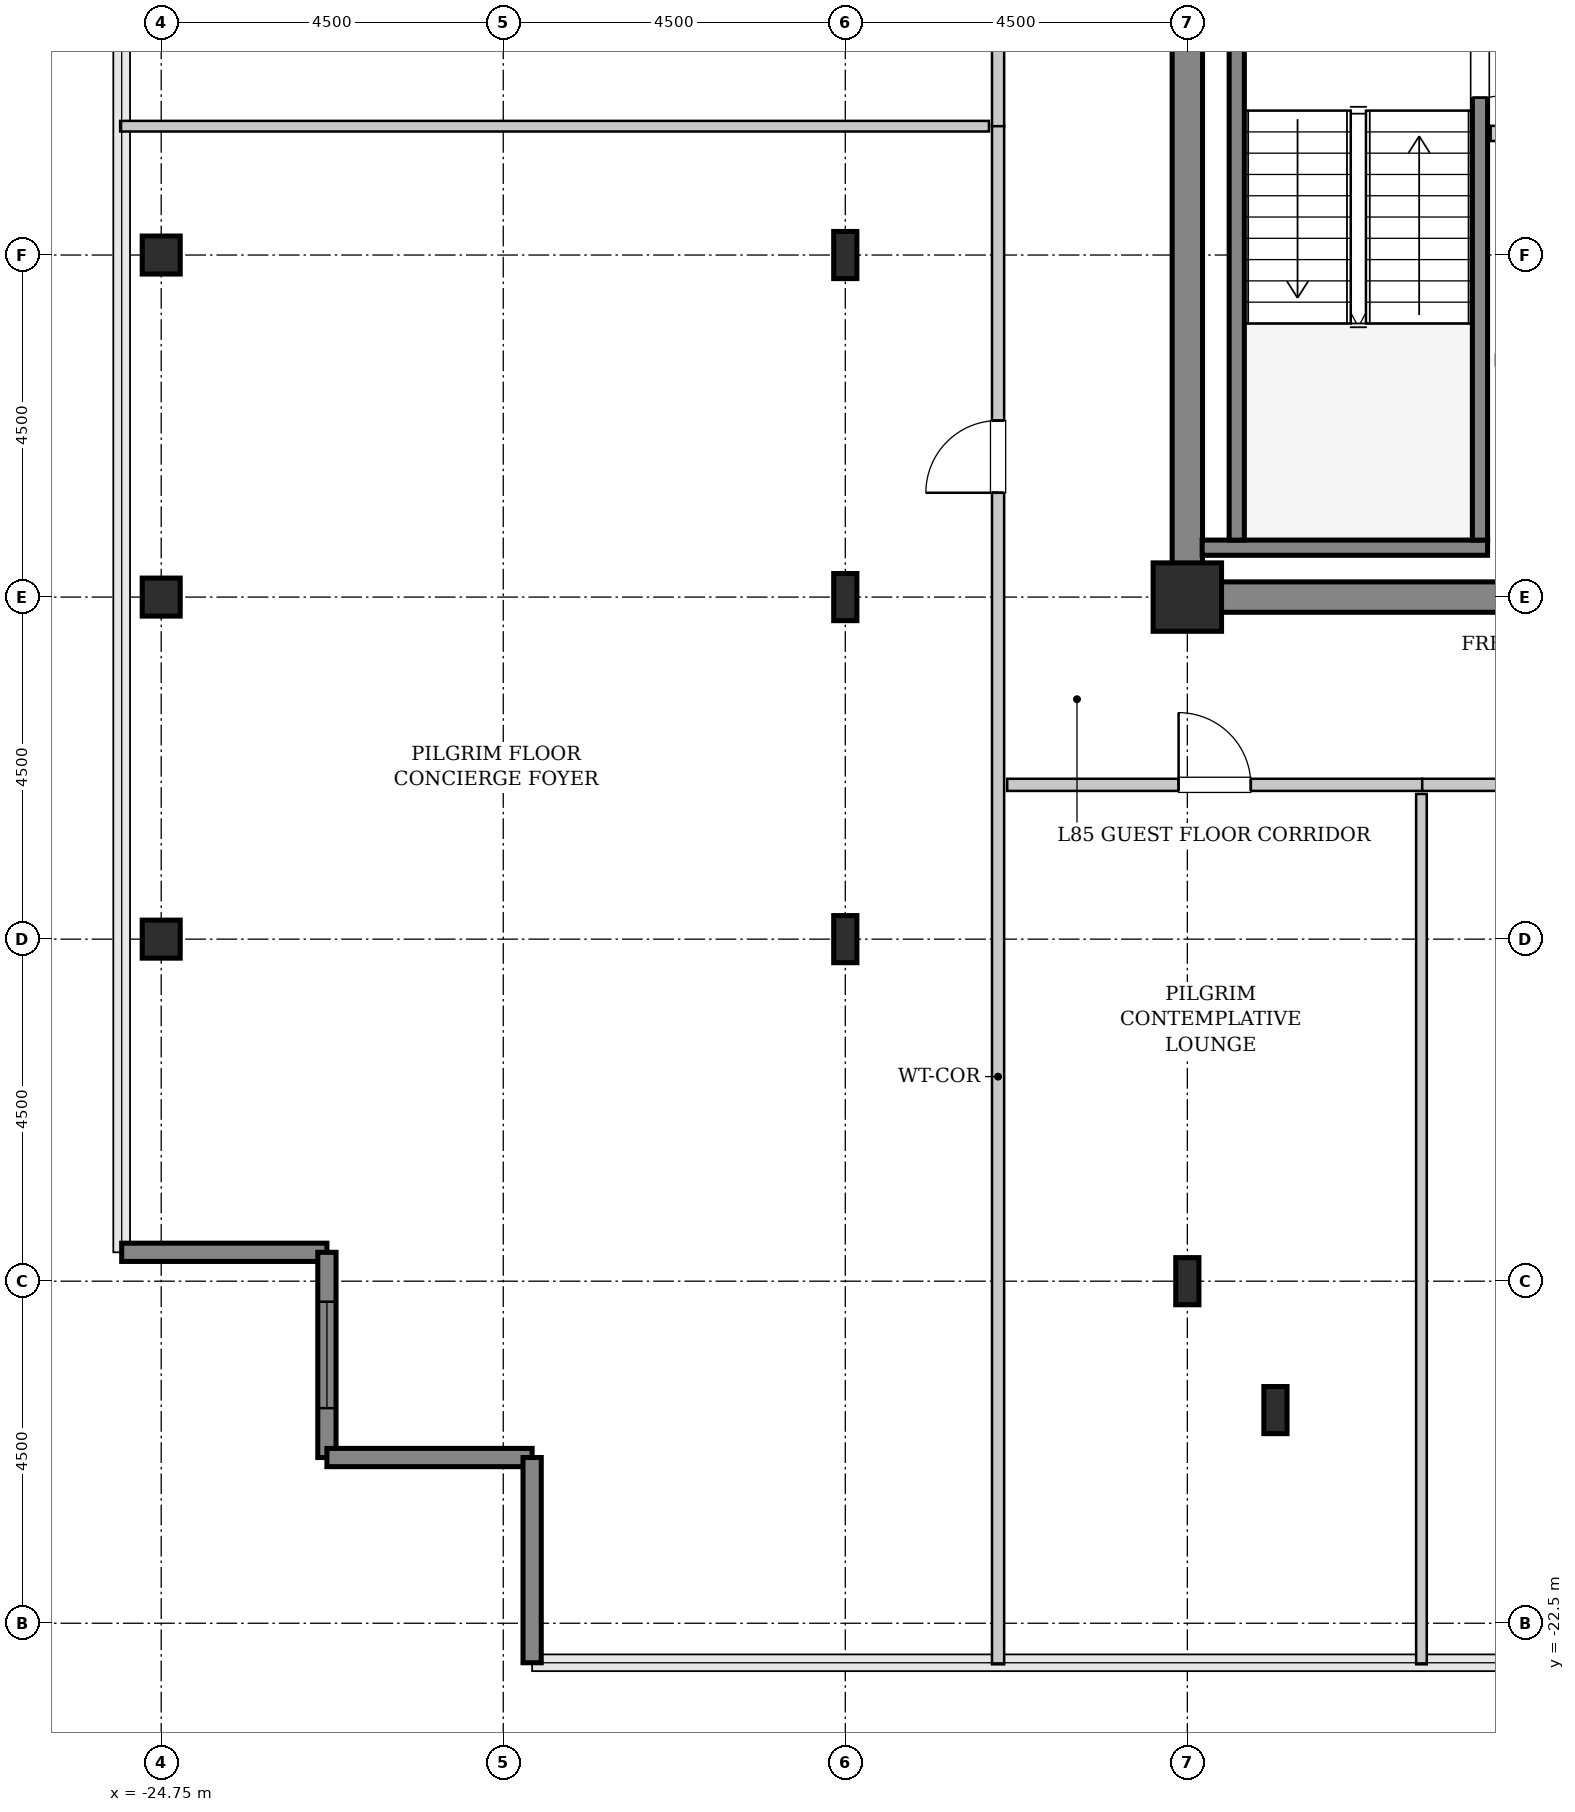
"""IFC4 building model, lengths in metres.
Left out: names, types, materials, properties, quantities, classifications, styles, units other than length and angle.
Written with IfcOpenShell. Run it as: python <this file> out.ifc"""

import sys

from ifc_helpers import new_model, si_unit, direction, frame, frame_2d, origin, origin_2d, place, context, subcontext, project, spatial, rectangle, hollow_rectangle, i_section, extrude, source, transform, mapped, element, fill, save


model = new_model("IFC4")
c1 = context("Model", 3, precision=1e-05, world=origin(), true_north=direction((0.0, 1.0)))
c2 = subcontext(c1, "Body", "Model", "MODEL_VIEW")
j1 = project(units=[si_unit("LENGTHUNIT", "METRE"), si_unit("PLANEANGLEUNIT", "RADIAN")], contexts=[c1])
p1 = place(None, origin())
s1 = spatial("IfcSite", under=j1, at=p1, CompositionType="ELEMENT")
p2 = place(p1, origin())
s2 = spatial("IfcBuilding", under=s1, at=p2, CompositionType="ELEMENT")
p3 = place(p2, frame((0.0, 0.0, 337.6)))
s3 = spatial("IfcBuildingStorey", under=s2, at=p3, CompositionType="ELEMENT", Elevation=337.6)
m1 = source(origin(), c2, "Body", "SweptSolid", [
    extrude(rectangle(XDim=9.9, YDim=0.4, at=frame_2d((4.95, 0.0))), origin(), (0.0, 0.0, 1.0), 3.8),
])
p4 = place(p3, frame((-11.45, -9.0, 0.0), z_axis=(0.0, 0.0, 1.0), x_axis=(1.0, 0.0, 0.0)))
e1 = element("IfcWall", 1, at=p4, inside=s3, PredefinedType="SHEAR", context=c2, shape_type="MappedRepresentation", body=[
    mapped(m1, transform((0.0, 0.0, 0.0), x_axis=(1.0, 0.0, 0.0), y_axis=(0.0, 1.0, 0.0), z_axis=(0.0, 0.0, 1.0), scale=1.0)),
])
m2 = source(origin(), c2, "Body", "SweptSolid", [
    extrude(rectangle(XDim=7.45, YDim=0.4, at=frame_2d((3.725, 0.0))), origin(), (0.0, 0.0, 1.0), 3.8),
])
p5 = place(p3, frame((-11.25, -8.8, 0.0), z_axis=(0.0, 0.0, 1.0), x_axis=(0.0, 1.0, 0.0)))
e2 = element("IfcWall", 2, at=p5, inside=s3, PredefinedType="SHEAR", context=c2, shape_type="MappedRepresentation", body=[
    mapped(m2, transform((0.0, 0.0, 0.0), x_axis=(1.0, 0.0, 0.0), y_axis=(0.0, 1.0, 0.0), z_axis=(0.0, 0.0, 1.0), scale=1.0)),
])
m3 = source(origin(), c2, "Body", "SweptSolid", [
    extrude(hollow_rectangle(XDim=0.5, YDim=0.5, WallThickness=0.025, InnerFilletRadius=0.025, OuterFilletRadius=0.05, at=origin_2d()), origin(), (0.0, 0.0, 1.0), 3.8),
])
for number, where, z_axis, x_axis in (
    (3, (-24.75, -13.5, 0.0), (0.0, 0.0, 1.0), (1.0, 0.0, 0.0)),
    (4, (-24.75, -9.0, 0.0), (0.0, 0.0, 1.0), (1.0, 0.0, 0.0)),
    (5, (-24.75, -4.5, 0.0), (0.0, 0.0, 1.0), (1.0, 0.0, 0.0)),
):
    element("IfcColumn", number, at=place(p3, frame(where, z_axis=z_axis, x_axis=x_axis)), inside=s3, PredefinedType="COLUMN", context=c2, shape_type="MappedRepresentation", body=[
        mapped(m3, transform((0.0, 0.0, 0.0), x_axis=(1.0, 0.0, 0.0), y_axis=(0.0, 1.0, 0.0), z_axis=(0.0, 0.0, 1.0), scale=1.0)),
    ])
m4 = source(origin(), c2, "Body", "SweptSolid", [
    extrude(i_section(OverallWidth=0.305, OverallDepth=0.62, WebThickness=0.021, FlangeThickness=0.04, FilletRadius=0.027, at=origin_2d()), origin(), (0.0, 0.0, 1.0), 3.8),
])
for number, where, z_axis, x_axis in (
    (6, (-15.75, -13.5, 0.0), (0.0, 0.0, 1.0), (1.0, 0.0, 0.0)),
    (7, (-15.75, -9.0, 0.0), (0.0, 0.0, 1.0), (1.0, 0.0, 0.0)),
    (8, (-15.75, -4.5, 0.0), (0.0, 0.0, 1.0), (1.0, 0.0, 0.0)),
    (9, (-11.25, -18.0, 0.0), (0.0, 0.0, 1.0), (1.0, 0.0, 0.0)),
):
    element("IfcColumn", number, at=place(p3, frame(where, z_axis=z_axis, x_axis=x_axis)), inside=s3, PredefinedType="COLUMN", context=c2, shape_type="MappedRepresentation", body=[
        mapped(m4, transform((0.0, 0.0, 0.0), x_axis=(1.0, 0.0, 0.0), y_axis=(0.0, 1.0, 0.0), z_axis=(0.0, 0.0, 1.0), scale=1.0)),
    ])
m5 = source(origin(), c2, "Body", "SweptSolid", [
    extrude(rectangle(XDim=0.9, YDim=0.9, at=origin_2d()), origin(), (0.0, 0.0, 1.0), 3.8),
])
p6 = place(p3, frame((-11.25, -9.0, 0.0), z_axis=(0.0, 0.0, 1.0), x_axis=(1.0, 0.0, 0.0)))
e10 = element("IfcColumn", 10, at=p6, inside=s3, PredefinedType="COLUMN", context=c2, shape_type="MappedRepresentation", body=[
    mapped(m5, transform((0.0, 0.0, 0.0), x_axis=(1.0, 0.0, 0.0), y_axis=(0.0, 1.0, 0.0), z_axis=(0.0, 0.0, 1.0), scale=1.0)),
])
p7 = place(p3, frame((-10.091, -19.696, 0.0), z_axis=(0.0, 0.0, 1.0), x_axis=(1.0, 0.0, 0.0)))
e11 = element("IfcColumn", 11, at=p7, inside=s3, PredefinedType="COLUMN", context=c2, shape_type="MappedRepresentation", body=[
    mapped(m4, transform((0.0, 0.0, 0.0), x_axis=(1.0, 0.0, 0.0), y_axis=(0.0, 1.0, 0.0), z_axis=(0.0, 0.0, 1.0), scale=1.0)),
])
m6 = source(origin(), c2, "Body", "SweptSolid", [
    extrude(rectangle(XDim=2.7, YDim=0.24, at=frame_2d((1.35, 0.0))), origin(), (0.0, 0.0, 1.0), 3.55),
])
p8 = place(p3, frame((-25.27, -17.62, 0.0), z_axis=(0.0, 0.0, 1.0), x_axis=(1.0, 0.0, 0.0)))
e12 = element("IfcWall", 12, at=p8, inside=s3, PredefinedType="SHEAR", context=c2, shape_type="MappedRepresentation", body=[
    mapped(m6, transform((0.0, 0.0, 0.0), x_axis=(1.0, 0.0, 0.0), y_axis=(0.0, 1.0, 0.0), z_axis=(0.0, 0.0, 1.0), scale=1.0)),
])
p9 = place(p3, frame((-22.57, -17.62, 0.0), z_axis=(0.0, 0.0, 1.0), x_axis=(0.0, -1.0, 0.0)))
e13 = element("IfcWall", 13, at=p9, inside=s3, PredefinedType="SHEAR", context=c2, shape_type="MappedRepresentation", body=[
    mapped(m6, transform((0.0, 0.0, 0.0), x_axis=(1.0, 0.0, 0.0), y_axis=(0.0, 1.0, 0.0), z_axis=(0.0, 0.0, 1.0), scale=1.0)),
])
p10 = place(p9, frame((0.65, 0.0, 0.85)))
e14 = element("IfcOpeningElement", 14, at=p10, cuts=e13, PredefinedType="OPENING", context=c2, shape_type="SweptSolid", body=[
    extrude(rectangle(XDim=1.4, YDim=1.8, at=frame_2d((0.7, 0.9))), frame((0.0, 0.13, 0.0), z_axis=(0.0, -1.0, 0.0), x_axis=(1.0, 0.0, 0.0)), (0.0, 0.0, 1.0), 0.26),
])
for number, where, z_axis, x_axis in (
    (15, (-22.57, -20.32, 0.0), (0.0, 0.0, 1.0), (1.0, 0.0, 0.0)),
    (16, (-19.87, -20.32, 0.0), (0.0, 0.0, 1.0), (0.0, -1.0, 0.0)),
):
    element("IfcWall", number, at=place(p3, frame(where, z_axis=z_axis, x_axis=x_axis)), inside=s3, PredefinedType="SHEAR", context=c2, shape_type="MappedRepresentation", body=[
        mapped(m6, transform((0.0, 0.0, 0.0), x_axis=(1.0, 0.0, 0.0), y_axis=(0.0, 1.0, 0.0), z_axis=(0.0, 0.0, 1.0), scale=1.0)),
    ])
m7 = source(origin(), c2, "Body", "SweptSolid", [
    extrude(rectangle(XDim=3.755, YDim=0.2, at=frame_2d((1.877, 0.0))), origin(), (0.0, 0.0, 1.0), 3.8),
])
p11 = place(p3, frame((-11.055, -8.35, 0.0), z_axis=(0.0, 0.0, 1.0), x_axis=(1.0, 0.0, 0.0)))
e17 = element("IfcWall", 17, at=p11, inside=s3, PredefinedType="SOLIDWALL", context=c2, shape_type="MappedRepresentation", body=[
    mapped(m7, transform((0.0, 0.0, 0.0), x_axis=(1.0, 0.0, 0.0), y_axis=(0.0, 1.0, 0.0), z_axis=(0.0, 0.0, 1.0), scale=1.0)),
])
m8 = source(origin(), c2, "Body", "SweptSolid", [
    extrude(rectangle(XDim=7.1, YDim=0.2, at=frame_2d((3.55, 0.0))), origin(), (0.0, 0.0, 1.0), 3.8),
])
p12 = place(p3, frame((-10.6, -1.15, 0.0), z_axis=(0.0, 0.0, 1.0), x_axis=(0.0, -1.0, 0.0)))
e18 = element("IfcWall", 18, at=p12, inside=s3, PredefinedType="SOLIDWALL", context=c2, shape_type="MappedRepresentation", body=[
    mapped(m8, transform((0.0, 0.0, 0.0), x_axis=(1.0, 0.0, 0.0), y_axis=(0.0, 1.0, 0.0), z_axis=(0.0, 0.0, 1.0), scale=1.0)),
])
p13 = place(p3, frame((-7.4, -1.15, 0.0), z_axis=(0.0, 0.0, 1.0), x_axis=(0.0, -1.0, 0.0)))
e19 = element("IfcWall", 19, at=p13, inside=s3, PredefinedType="SOLIDWALL", context=c2, shape_type="MappedRepresentation", body=[
    mapped(m8, transform((0.0, 0.0, 0.0), x_axis=(1.0, 0.0, 0.0), y_axis=(0.0, 1.0, 0.0), z_axis=(0.0, 0.0, 1.0), scale=1.0)),
])
p14 = place(p13, frame((0.18, 0.0, 0.0)))
e20 = element("IfcOpeningElement", 20, at=p14, cuts=e19, PredefinedType="OPENING", context=c2, shape_type="SweptSolid", body=[
    extrude(rectangle(XDim=1.1, YDim=2.15, at=frame_2d((0.55, 1.075))), frame((0.0, 0.11, 0.0), z_axis=(0.0, -1.0, 0.0), x_axis=(1.0, 0.0, 0.0)), (0.0, 0.0, 1.0), 0.22),
])
m9 = source(origin(), c2, "Body", "SweptSolid", [
    extrude(rectangle(XDim=2.9, YDim=0.2, at=frame_2d((1.45, 0.0))), origin(), (0.0, 0.0, 1.0), 3.535),
])
p15 = place(p3, frame((-7.26, -2.9, 0.0), z_axis=(0.0, 0.0, 1.0), x_axis=(1.0, 0.0, 0.0)))
e21 = element("IfcWall", 21, at=p15, inside=s3, PredefinedType="PARTITIONING", context=c2, shape_type="MappedRepresentation", body=[
    mapped(m9, transform((0.0, 0.0, 0.0), x_axis=(1.0, 0.0, 0.0), y_axis=(0.0, 1.0, 0.0), z_axis=(0.0, 0.0, 1.0), scale=1.0)),
])
m10 = source(origin(), c2, "Body", "SweptSolid", [
    extrude(rectangle(XDim=20.245, YDim=0.16, at=frame_2d((10.123, 0.0))), origin(), (0.0, 0.0, 1.0), 3.535),
])
p16 = place(p3, frame((-13.74, -23.04, 0.0), z_axis=(0.0, 0.0, 1.0), x_axis=(0.0, 1.0, 0.0)))
e22 = element("IfcWall", 22, at=p16, inside=s3, PredefinedType="PARTITIONING", context=c2, shape_type="MappedRepresentation", body=[
    mapped(m10, transform((0.0, 0.0, 0.0), x_axis=(1.0, 0.0, 0.0), y_axis=(0.0, 1.0, 0.0), z_axis=(0.0, 0.0, 1.0), scale=1.0)),
])
p17 = place(p16, frame((15.413, 0.0, 0.0)))
e23 = element("IfcOpeningElement", 23, at=p17, cuts=e22, PredefinedType="OPENING", context=c2, shape_type="SweptSolid", body=[
    extrude(rectangle(XDim=0.95, YDim=2.1, at=frame_2d((0.475, 1.05))), frame((0.0, 0.09, 0.0), z_axis=(0.0, -1.0, 0.0), x_axis=(1.0, 0.0, 0.0)), (0.0, 0.0, 1.0), 0.18),
])
m11 = source(origin(), c2, "Body", "SweptSolid", [
    extrude(rectangle(XDim=11.43, YDim=0.14, at=frame_2d((5.715, 0.0))), origin(), (0.0, 0.0, 1.0), 3.535),
])
p18 = place(p3, frame((-25.29, -2.805, 0.0), z_axis=(0.0, 0.0, 1.0), x_axis=(1.0, 0.0, 0.0)))
e24 = element("IfcWall", 24, at=p18, inside=s3, PredefinedType="PARTITIONING", context=c2, shape_type="MappedRepresentation", body=[
    mapped(m11, transform((0.0, 0.0, 0.0), x_axis=(1.0, 0.0, 0.0), y_axis=(0.0, 1.0, 0.0), z_axis=(0.0, 0.0, 1.0), scale=1.0)),
])
m12 = source(origin(), c2, "Body", "SweptSolid", [
    extrude(rectangle(XDim=6.446, YDim=0.16, at=frame_2d((3.223, 0.0))), origin(), (0.0, 0.0, 1.0), 3.535),
])
p19 = place(p3, frame((-13.74, -2.805, 0.0), z_axis=(0.0, 0.0, 1.0), x_axis=(0.0, 1.0, 0.0)))
e25 = element("IfcWall", 25, at=p19, inside=s3, PredefinedType="PARTITIONING", context=c2, shape_type="MappedRepresentation", body=[
    mapped(m12, transform((0.0, 0.0, 0.0), x_axis=(1.0, 0.0, 0.0), y_axis=(0.0, 1.0, 0.0), z_axis=(0.0, 0.0, 1.0), scale=1.0)),
])
p20 = place(p19, frame((2.748, 0.0, 0.0)))
e26 = element("IfcOpeningElement", 26, at=p20, cuts=e25, PredefinedType="OPENING", context=c2, shape_type="SweptSolid", body=[
    extrude(rectangle(XDim=0.95, YDim=2.1, at=frame_2d((0.475, 1.05))), frame((0.0, 0.09, 0.0), z_axis=(0.0, -1.0, 0.0), x_axis=(1.0, 0.0, 0.0)), (0.0, 0.0, 1.0), 0.18),
])
m13 = source(origin(), c2, "Body", "SweptSolid", [
    extrude(rectangle(XDim=5.46, YDim=0.16, at=frame_2d((2.73, 0.0))), origin(), (0.0, 0.0, 1.0), 3.535),
])
p21 = place(p3, frame((-13.62, -11.47, 0.0), z_axis=(0.0, 0.0, 1.0), x_axis=(1.0, 0.0, 0.0)))
e27 = element("IfcWall", 27, at=p21, inside=s3, PredefinedType="PARTITIONING", context=c2, shape_type="MappedRepresentation", body=[
    mapped(m13, transform((0.0, 0.0, 0.0), x_axis=(1.0, 0.0, 0.0), y_axis=(0.0, 1.0, 0.0), z_axis=(0.0, 0.0, 1.0), scale=1.0)),
])
p22 = place(p21, frame((2.255, 0.0, 0.0)))
e28 = element("IfcOpeningElement", 28, at=p22, cuts=e27, PredefinedType="OPENING", context=c2, shape_type="SweptSolid", body=[
    extrude(rectangle(XDim=0.95, YDim=2.1, at=frame_2d((0.475, 1.05))), frame((0.0, 0.09, 0.0), z_axis=(0.0, -1.0, 0.0), x_axis=(1.0, 0.0, 0.0)), (0.0, 0.0, 1.0), 0.18),
])
m14 = source(origin(), c2, "Body", "SweptSolid", [
    extrude(rectangle(XDim=11.45, YDim=0.14, at=frame_2d((5.725, 0.0))), origin(), (0.0, 0.0, 1.0), 3.535),
])
p23 = place(p3, frame((-8.17, -23.04, 0.0), z_axis=(0.0, 0.0, 1.0), x_axis=(0.0, 1.0, 0.0)))
e29 = element("IfcWall", 29, at=p23, inside=s3, PredefinedType="PARTITIONING", context=c2, shape_type="MappedRepresentation", body=[
    mapped(m14, transform((0.0, 0.0, 0.0), x_axis=(1.0, 0.0, 0.0), y_axis=(0.0, 1.0, 0.0), z_axis=(0.0, 0.0, 1.0), scale=1.0)),
])
m15 = source(origin(), c2, "Body", "SweptSolid", [
    extrude(rectangle(XDim=5.565, YDim=0.16, at=frame_2d((2.782, 0.0))), origin(), (0.0, 0.0, 1.0), 3.535),
])
p24 = place(p3, frame((-8.16, -11.47, 0.0), z_axis=(0.0, 0.0, 1.0), x_axis=(1.0, 0.0, 0.0)))
e30 = element("IfcWall", 30, at=p24, inside=s3, PredefinedType="PARTITIONING", context=c2, shape_type="MappedRepresentation", body=[
    mapped(m15, transform((0.0, 0.0, 0.0), x_axis=(1.0, 0.0, 0.0), y_axis=(0.0, 1.0, 0.0), z_axis=(0.0, 0.0, 1.0), scale=1.0)),
])
p25 = place(p24, frame((2.308, 0.0, 0.0)))
e31 = element("IfcOpeningElement", 31, at=p25, cuts=e30, PredefinedType="OPENING", context=c2, shape_type="SweptSolid", body=[
    extrude(rectangle(XDim=0.95, YDim=2.1, at=frame_2d((0.475, 1.05))), frame((0.0, 0.09, 0.0), z_axis=(0.0, -1.0, 0.0), x_axis=(1.0, 0.0, 0.0)), (0.0, 0.0, 1.0), 0.18),
])
m16 = source(origin(), c2, "Body", "SweptSolid", [
    extrude(rectangle(XDim=1.4, YDim=1.8, at=frame_2d((0.7, 0.9))), frame((0.0, 0.03, 0.0), z_axis=(0.0, -1.0, 0.0), x_axis=(1.0, 0.0, 0.0)), (0.0, 0.0, 1.0), 0.06),
])
p26 = place(p10, origin())
e32 = element("IfcWindow", 32, at=p26, inside=s3, PartitioningType="SINGLE_PANEL", PredefinedType="WINDOW", context=c2, shape_type="MappedRepresentation", body=[
    mapped(m16, transform((0.0, 0.0, 0.0), x_axis=(1.0, 0.0, 0.0), y_axis=(0.0, 1.0, 0.0), z_axis=(0.0, 0.0, 1.0), scale=1.0)),
])
fill(e14, e32)
m17 = source(origin(), c2, "Body", "SweptSolid", [
    extrude(rectangle(XDim=1.1, YDim=2.15, at=frame_2d((0.55, 1.075))), frame((0.0, 0.025, 0.0), z_axis=(0.0, -1.0, 0.0), x_axis=(1.0, 0.0, 0.0)), (0.0, 0.0, 1.0), 0.05),
])
p27 = place(p14, origin())
e33 = element("IfcDoor", 33, at=p27, inside=s3, OperationType="SINGLE_SWING_LEFT", PredefinedType="DOOR", context=c2, shape_type="MappedRepresentation", body=[
    mapped(m17, transform((0.0, 0.0, 0.0), x_axis=(1.0, 0.0, 0.0), y_axis=(0.0, 1.0, 0.0), z_axis=(0.0, 0.0, 1.0), scale=1.0)),
])
fill(e20, e33)
m18 = source(origin(), c2, "Body", "SweptSolid", [
    extrude(rectangle(XDim=0.95, YDim=2.1, at=frame_2d((0.475, 1.05))), frame((0.0, 0.025, 0.0), z_axis=(0.0, -1.0, 0.0), x_axis=(1.0, 0.0, 0.0)), (0.0, 0.0, 1.0), 0.05),
])
p28 = place(p17, origin())
e34 = element("IfcDoor", 34, at=p28, inside=s3, OperationType="SINGLE_SWING_LEFT", PredefinedType="DOOR", context=c2, shape_type="MappedRepresentation", body=[
    mapped(m18, transform((0.0, 0.0, 0.0), x_axis=(1.0, 0.0, 0.0), y_axis=(0.0, 1.0, 0.0), z_axis=(0.0, 0.0, 1.0), scale=1.0)),
])
fill(e23, e34)
p29 = place(p22, origin())
e35 = element("IfcDoor", 35, at=p29, inside=s3, OperationType="SINGLE_SWING_LEFT", PredefinedType="DOOR", context=c2, shape_type="MappedRepresentation", body=[
    mapped(m18, transform((0.0, 0.0, 0.0), x_axis=(1.0, 0.0, 0.0), y_axis=(0.0, 1.0, 0.0), z_axis=(0.0, 0.0, 1.0), scale=1.0)),
])
fill(e28, e35)
save(model, sys.argv[1])
